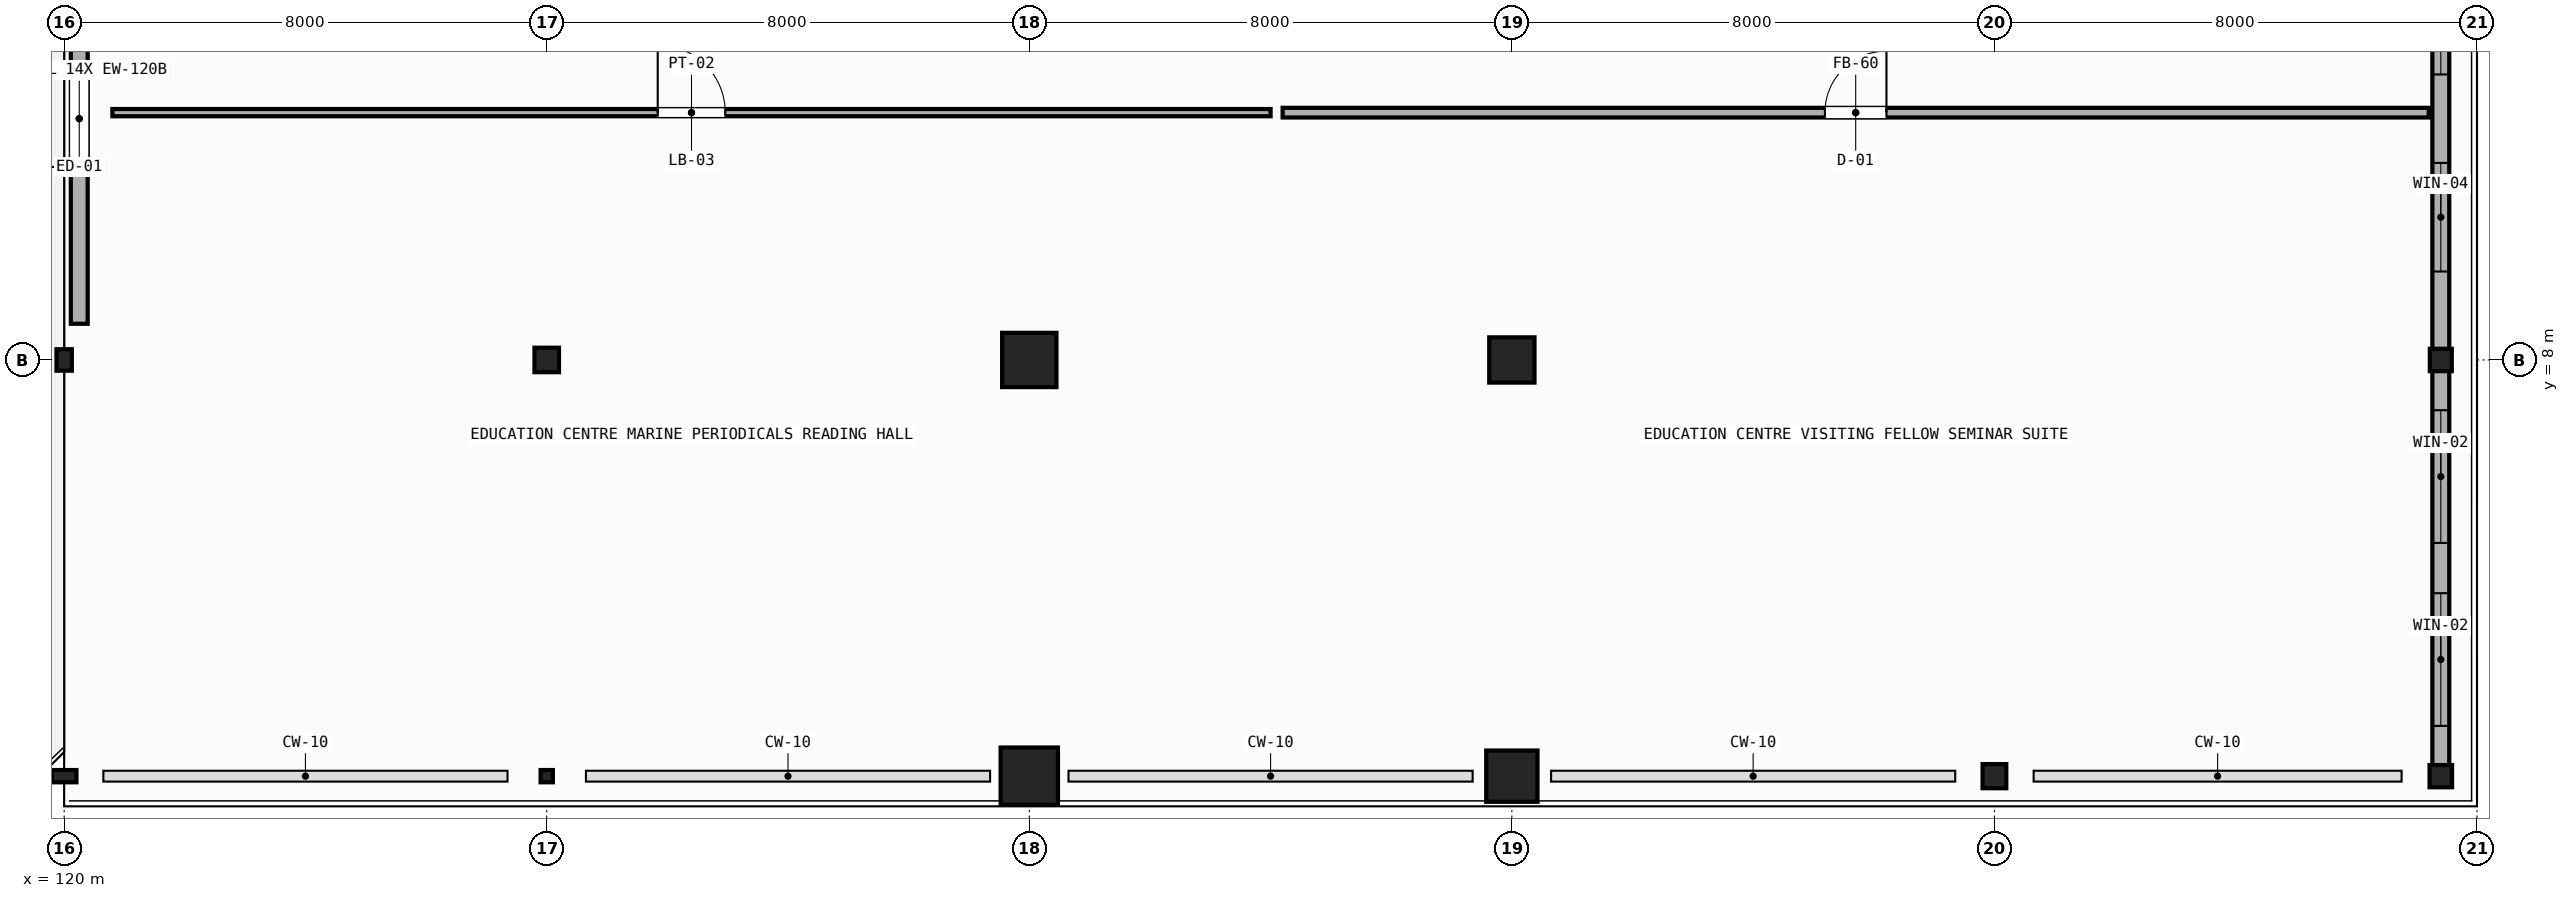
"""IFC4 building model, lengths in metres.
Left out: names, types, materials, properties, quantities, classifications, styles, units other than length and angle.
Written with IfcOpenShell. Run it as: python <this file> out.ifc"""

import sys

from ifc_helpers import new_model, si_unit, direction, frame, frame_2d, origin, origin_2d, place, context, subcontext, project, spatial, rectangle, hollow_rectangle, circle, hollow_circle, i_section, extrude, element, fill, save


model = new_model("IFC4")
c1 = context("Model", 3, precision=1e-05, world=origin(), true_north=direction((0.0, 1.0)))
c2 = subcontext(c1, "Body", "Model", "MODEL_VIEW")
j1 = project(units=[si_unit("LENGTHUNIT", "METRE"), si_unit("PLANEANGLEUNIT", "RADIAN")], contexts=[c1])
p1 = place(None, origin())
s1 = spatial("IfcSite", under=j1, at=p1, CompositionType="ELEMENT")
p2 = place(p1, origin())
s2 = spatial("IfcBuilding", under=s1, at=p2, CompositionType="ELEMENT")
p3 = place(p2, frame((0.0, 0.0, 15.0)))
s3 = spatial("IfcBuildingStorey", under=s2, at=p3, CompositionType="ELEMENT", Elevation=15.0)
p4 = place(p3, frame((120.0, 1.1, 0.0), z_axis=(0.0, 0.0, 1.0), x_axis=(0.0, 1.0, 0.0)))
e1 = element("IfcColumn", 1, at=p4, inside=s3, PredefinedType="COLUMN", context=c2, shape_type="SweptSolid", body=[
    extrude(hollow_rectangle(XDim=0.203, YDim=0.406, WallThickness=0.012, InnerFilletRadius=0.012, OuterFilletRadius=0.024, at=origin_2d()), origin(), (0.0, 0.0, 1.0), 4.8),
])
p5 = place(p3, frame((120.0, 8.0, 0.0), z_axis=(0.0, 0.0, 1.0), x_axis=(1.0, 0.0, 0.0)))
e2 = element("IfcColumn", 2, at=p5, inside=s3, PredefinedType="COLUMN", context=c2, shape_type="SweptSolid", body=[
    extrude(hollow_rectangle(XDim=0.254, YDim=0.356, WallThickness=0.012, InnerFilletRadius=0.012, OuterFilletRadius=0.024, at=origin_2d()), origin(), (0.0, 0.0, 1.0), 4.8),
])
p6 = place(p3, frame((128.0, 1.1, 0.0), z_axis=(0.0, 0.0, 1.0), x_axis=(1.0, 0.0, 0.0)))
e3 = element("IfcColumn", 3, at=p6, inside=s3, PredefinedType="COLUMN", context=c2, shape_type="SweptSolid", body=[
    extrude(hollow_rectangle(XDim=0.203, YDim=0.203, WallThickness=0.009, InnerFilletRadius=0.009, OuterFilletRadius=0.018, at=origin_2d()), origin(), (0.0, 0.0, 1.0), 4.8),
])
p7 = place(p3, frame((128.0, 8.0, 0.0), z_axis=(0.0, 0.0, 1.0), x_axis=(0.0, 1.0, 0.0)))
e4 = element("IfcColumn", 4, at=p7, inside=s3, PredefinedType="COLUMN", context=c2, shape_type="SweptSolid", body=[
    extrude(hollow_circle(Radius=0.203, WallThickness=0.012, at=origin_2d()), origin(), (0.0, 0.0, 1.0), 4.8),
])
p8 = place(p3, frame((136.0, 1.1, 0.0), z_axis=(0.0, 0.0, 1.0), x_axis=(0.0, 1.0, 0.0)))
e5 = element("IfcColumn", 5, at=p8, inside=s3, PredefinedType="COLUMN", context=c2, shape_type="SweptSolid", body=[
    extrude(rectangle(XDim=0.95, YDim=0.95, at=origin_2d()), origin(), (0.0, 0.0, 1.0), 4.8),
])
p9 = place(p3, frame((136.0, 8.0, 0.0), z_axis=(0.0, 0.0, 1.0), x_axis=(1.0, 0.0, 0.0)))
e6 = element("IfcColumn", 6, at=p9, inside=s3, PredefinedType="COLUMN", context=c2, shape_type="SweptSolid", body=[
    extrude(rectangle(XDim=0.9, YDim=0.9, at=origin_2d()), origin(), (0.0, 0.0, 1.0), 4.8),
])
p10 = place(p3, frame((144.0, 1.1, 0.0), z_axis=(0.0, 0.0, 1.0), x_axis=(1.0, 0.0, 0.0)))
e7 = element("IfcColumn", 7, at=p10, inside=s3, PredefinedType="COLUMN", context=c2, shape_type="SweptSolid", body=[
    extrude(circle(Radius=0.425, at=origin_2d()), origin(), (0.0, 0.0, 1.0), 4.8),
])
p11 = place(p3, frame((144.0, 8.0, 0.0), z_axis=(0.0, 0.0, 1.0), x_axis=(0.0, 1.0, 0.0)))
e8 = element("IfcColumn", 8, at=p11, inside=s3, PredefinedType="COLUMN", context=c2, shape_type="SweptSolid", body=[
    extrude(circle(Radius=0.375, at=origin_2d()), origin(), (0.0, 0.0, 1.0), 4.8),
])
p12 = place(p3, frame((152.0, 1.1, 0.0), z_axis=(0.0, 0.0, 1.0), x_axis=(0.0, 1.0, 0.0)))
e9 = element("IfcColumn", 9, at=p12, inside=s3, PredefinedType="COLUMN", context=c2, shape_type="SweptSolid", body=[
    extrude(i_section(OverallWidth=0.4, OverallDepth=0.393, WebThickness=0.023, FlangeThickness=0.037, FilletRadius=0.015, at=origin_2d()), origin(), (0.0, 0.0, 1.0), 4.8),
])
p13 = place(p3, frame((159.4, 1.1, 0.0), z_axis=(0.0, 0.0, 1.0), x_axis=(1.0, 0.0, 0.0)))
e10 = element("IfcColumn", 10, at=p13, inside=s3, PredefinedType="COLUMN", context=c2, shape_type="SweptSolid", body=[
    extrude(i_section(OverallWidth=0.373, OverallDepth=0.368, WebThickness=0.015, FlangeThickness=0.024, FilletRadius=0.015, at=origin_2d()), origin(), (0.0, 0.0, 1.0), 4.8),
])
p14 = place(p3, frame((159.4, 8.0, 0.0), z_axis=(0.0, 0.0, 1.0), x_axis=(0.0, 1.0, 0.0)))
e11 = element("IfcColumn", 11, at=p14, inside=s3, PredefinedType="COLUMN", context=c2, shape_type="SweptSolid", body=[
    extrude(i_section(OverallWidth=0.371, OverallDepth=0.364, WebThickness=0.013, FlangeThickness=0.022, FilletRadius=0.015, at=origin_2d()), origin(), (0.0, 0.0, 1.0), 4.8),
])
p15 = place(p3, frame((120.25, 8.6, 0.0), z_axis=(0.0, 0.0, 1.0), x_axis=(0.0, 1.0, 0.0)))
e12 = element("IfcWall", 12, at=p15, inside=s3, PredefinedType="STANDARD", context=c2, shape_type="SweptSolid", body=[
    extrude(rectangle(XDim=6.8, YDim=0.28, at=frame_2d((3.4, 0.0))), origin(), (0.0, 0.0, 1.0), 4.4),
])
p16 = place(p15, frame((2.6, 0.0, 0.0)))
e13 = element("IfcOpeningElement", 13, at=p16, cuts=e12, PredefinedType="OPENING", context=c2, shape_type="SweptSolid", body=[
    extrude(rectangle(XDim=1.6, YDim=2.25, at=frame_2d((0.8, 1.125))), frame((0.0, 0.15, 0.0), z_axis=(0.0, -1.0, 0.0), x_axis=(1.0, 0.0, 0.0)), (0.0, 0.0, 1.0), 0.3),
])
p17 = place(p3, frame((159.4, 1.1, 0.0), z_axis=(0.0, 0.0, 1.0), x_axis=(0.0, 1.0, 0.0)))
e14 = element("IfcWall", 14, at=p17, inside=s3, PredefinedType="STANDARD", context=c2, shape_type="SweptSolid", body=[
    extrude(rectangle(XDim=6.9, YDim=0.28, at=frame_2d((3.45, 0.0))), origin(), (0.0, 0.0, 1.0), 4.047),
])
p18 = place(p17, frame((0.833, 0.0, 0.85)))
e15 = element("IfcOpeningElement", 15, at=p18, cuts=e14, PredefinedType="OPENING", context=c2, shape_type="SweptSolid", body=[
    extrude(rectangle(XDim=2.2, YDim=2.8, at=frame_2d((1.1, 1.4))), frame((0.0, 0.15, 0.0), z_axis=(0.0, -1.0, 0.0), x_axis=(1.0, 0.0, 0.0)), (0.0, 0.0, 1.0), 0.3),
])
p19 = place(p17, frame((3.867, 0.0, 0.85)))
e16 = element("IfcOpeningElement", 16, at=p19, cuts=e14, PredefinedType="OPENING", context=c2, shape_type="SweptSolid", body=[
    extrude(rectangle(XDim=2.2, YDim=2.8, at=frame_2d((1.1, 1.4))), frame((0.0, 0.15, 0.0), z_axis=(0.0, -1.0, 0.0), x_axis=(1.0, 0.0, 0.0)), (0.0, 0.0, 1.0), 0.3),
])
p20 = place(p3, frame((159.4, 8.0, 0.0), z_axis=(0.0, 0.0, 1.0), x_axis=(0.0, 1.0, 0.0)))
e17 = element("IfcWall", 17, at=p20, inside=s3, PredefinedType="STANDARD", context=c2, shape_type="SweptSolid", body=[
    extrude(rectangle(XDim=8.0, YDim=0.28, at=frame_2d((4.0, 0.0))), origin(), (0.0, 0.0, 1.0), 4.5),
])
p21 = place(p20, frame((1.467, 0.0, 0.9)))
e18 = element("IfcOpeningElement", 18, at=p21, cuts=e17, PredefinedType="OPENING", context=c2, shape_type="SweptSolid", body=[
    extrude(rectangle(XDim=1.8, YDim=2.5, at=frame_2d((0.9, 1.25))), frame((0.0, 0.15, 0.0), z_axis=(0.0, -1.0, 0.0), x_axis=(1.0, 0.0, 0.0)), (0.0, 0.0, 1.0), 0.3),
])
p22 = place(p20, frame((4.733, 0.0, 0.9)))
e19 = element("IfcOpeningElement", 19, at=p22, cuts=e17, PredefinedType="OPENING", context=c2, shape_type="SweptSolid", body=[
    extrude(rectangle(XDim=1.8, YDim=2.5, at=frame_2d((0.9, 1.25))), frame((0.0, 0.15, 0.0), z_axis=(0.0, -1.0, 0.0), x_axis=(1.0, 0.0, 0.0)), (0.0, 0.0, 1.0), 0.3),
])
p23 = place(p3, frame((120.8, 12.1, 0.0), z_axis=(0.0, 0.0, 1.0), x_axis=(1.0, 0.0, 0.0)))
e20 = element("IfcWall", 20, at=p23, inside=s3, PredefinedType="PARTITIONING", context=c2, shape_type="SweptSolid", body=[
    extrude(rectangle(XDim=19.2, YDim=0.12, at=frame_2d((9.6, 0.0))), origin(), (0.0, 0.0, 1.0), 4.29),
])
p24 = place(p23, frame((9.04, 0.0, 0.0)))
e21 = element("IfcOpeningElement", 21, at=p24, cuts=e20, PredefinedType="OPENING", context=c2, shape_type="SweptSolid", body=[
    extrude(rectangle(XDim=1.12, YDim=2.15, at=frame_2d((0.56, 1.075))), frame((0.0, 0.07, 0.0), z_axis=(0.0, -1.0, 0.0), x_axis=(1.0, 0.0, 0.0)), (0.0, 0.0, 1.0), 0.14),
])
p25 = place(p3, frame((140.2, 12.1, 0.0), z_axis=(0.0, 0.0, 1.0), x_axis=(1.0, 0.0, 0.0)))
e22 = element("IfcWall", 22, at=p25, inside=s3, PredefinedType="PARTITIONING", context=c2, shape_type="SweptSolid", body=[
    extrude(rectangle(XDim=19.0, YDim=0.16, at=frame_2d((9.5, 0.0))), origin(), (0.0, 0.0, 1.0), 4.29),
])
p26 = place(p25, frame((8.99, 0.0, 0.0)))
e23 = element("IfcOpeningElement", 23, at=p26, cuts=e22, PredefinedType="OPENING", context=c2, shape_type="SweptSolid", body=[
    extrude(rectangle(XDim=1.02, YDim=2.15, at=frame_2d((0.51, 1.075))), frame((0.0, 0.09, 0.0), z_axis=(0.0, -1.0, 0.0), x_axis=(1.0, 0.0, 0.0)), (0.0, 0.0, 1.0), 0.18),
])
p27 = place(p16, origin())
e24 = element("IfcDoor", 24, at=p27, inside=s3, OperationType="SINGLE_SWING_LEFT", PredefinedType="DOOR", context=c2, shape_type="SweptSolid", body=[
    extrude(rectangle(XDim=1.6, YDim=2.25, at=frame_2d((0.8, 1.125))), frame((0.0, 0.025, 0.0), z_axis=(0.0, -1.0, 0.0), x_axis=(1.0, 0.0, 0.0)), (0.0, 0.0, 1.0), 0.05),
])
fill(e13, e24)
p28 = place(p18, origin())
e25 = element("IfcWindow", 25, at=p28, inside=s3, PartitioningType="SINGLE_PANEL", PredefinedType="WINDOW", context=c2, shape_type="SweptSolid", body=[
    extrude(rectangle(XDim=2.2, YDim=2.8, at=frame_2d((1.1, 1.4))), frame((0.0, 0.03, 0.0), z_axis=(0.0, -1.0, 0.0), x_axis=(1.0, 0.0, 0.0)), (0.0, 0.0, 1.0), 0.06),
])
fill(e15, e25)
p29 = place(p19, origin())
e26 = element("IfcWindow", 26, at=p29, inside=s3, PartitioningType="SINGLE_PANEL", PredefinedType="WINDOW", context=c2, shape_type="SweptSolid", body=[
    extrude(rectangle(XDim=2.2, YDim=2.8, at=frame_2d((1.1, 1.4))), frame((0.0, 0.03, 0.0), z_axis=(0.0, -1.0, 0.0), x_axis=(1.0, 0.0, 0.0)), (0.0, 0.0, 1.0), 0.06),
])
fill(e16, e26)
p30 = place(p21, origin())
e27 = element("IfcWindow", 27, at=p30, inside=s3, PartitioningType="SINGLE_PANEL", PredefinedType="WINDOW", context=c2, shape_type="SweptSolid", body=[
    extrude(rectangle(XDim=1.8, YDim=2.5, at=frame_2d((0.9, 1.25))), frame((0.0, 0.03, 0.0), z_axis=(0.0, -1.0, 0.0), x_axis=(1.0, 0.0, 0.0)), (0.0, 0.0, 1.0), 0.06),
])
fill(e18, e27)
p31 = place(p22, origin())
e28 = element("IfcWindow", 28, at=p31, inside=s3, PartitioningType="SINGLE_PANEL", PredefinedType="WINDOW", context=c2, shape_type="SweptSolid", body=[
    extrude(rectangle(XDim=1.8, YDim=2.5, at=frame_2d((0.9, 1.25))), frame((0.0, 0.03, 0.0), z_axis=(0.0, -1.0, 0.0), x_axis=(1.0, 0.0, 0.0)), (0.0, 0.0, 1.0), 0.06),
])
fill(e19, e28)
p32 = place(p24, origin())
e29 = element("IfcDoor", 29, at=p32, inside=s3, OperationType="SINGLE_SWING_LEFT", PredefinedType="DOOR", context=c2, shape_type="SweptSolid", body=[
    extrude(rectangle(XDim=1.12, YDim=2.15, at=frame_2d((0.56, 1.075))), frame((0.0, 0.025, 0.0), z_axis=(0.0, -1.0, 0.0), x_axis=(1.0, 0.0, 0.0)), (0.0, 0.0, 1.0), 0.05),
])
fill(e21, e29)
p33 = place(p26, origin())
e30 = element("IfcDoor", 30, at=p33, inside=s3, OperationType="SINGLE_SWING_RIGHT", PredefinedType="DOOR", context=c2, shape_type="SweptSolid", body=[
    extrude(rectangle(XDim=1.02, YDim=2.15, at=frame_2d((0.51, 1.075))), frame((0.0, 0.025, 0.0), z_axis=(0.0, -1.0, 0.0), x_axis=(1.0, 0.0, 0.0)), (0.0, 0.0, 1.0), 0.05),
])
fill(e23, e30)
save(model, sys.argv[1])
